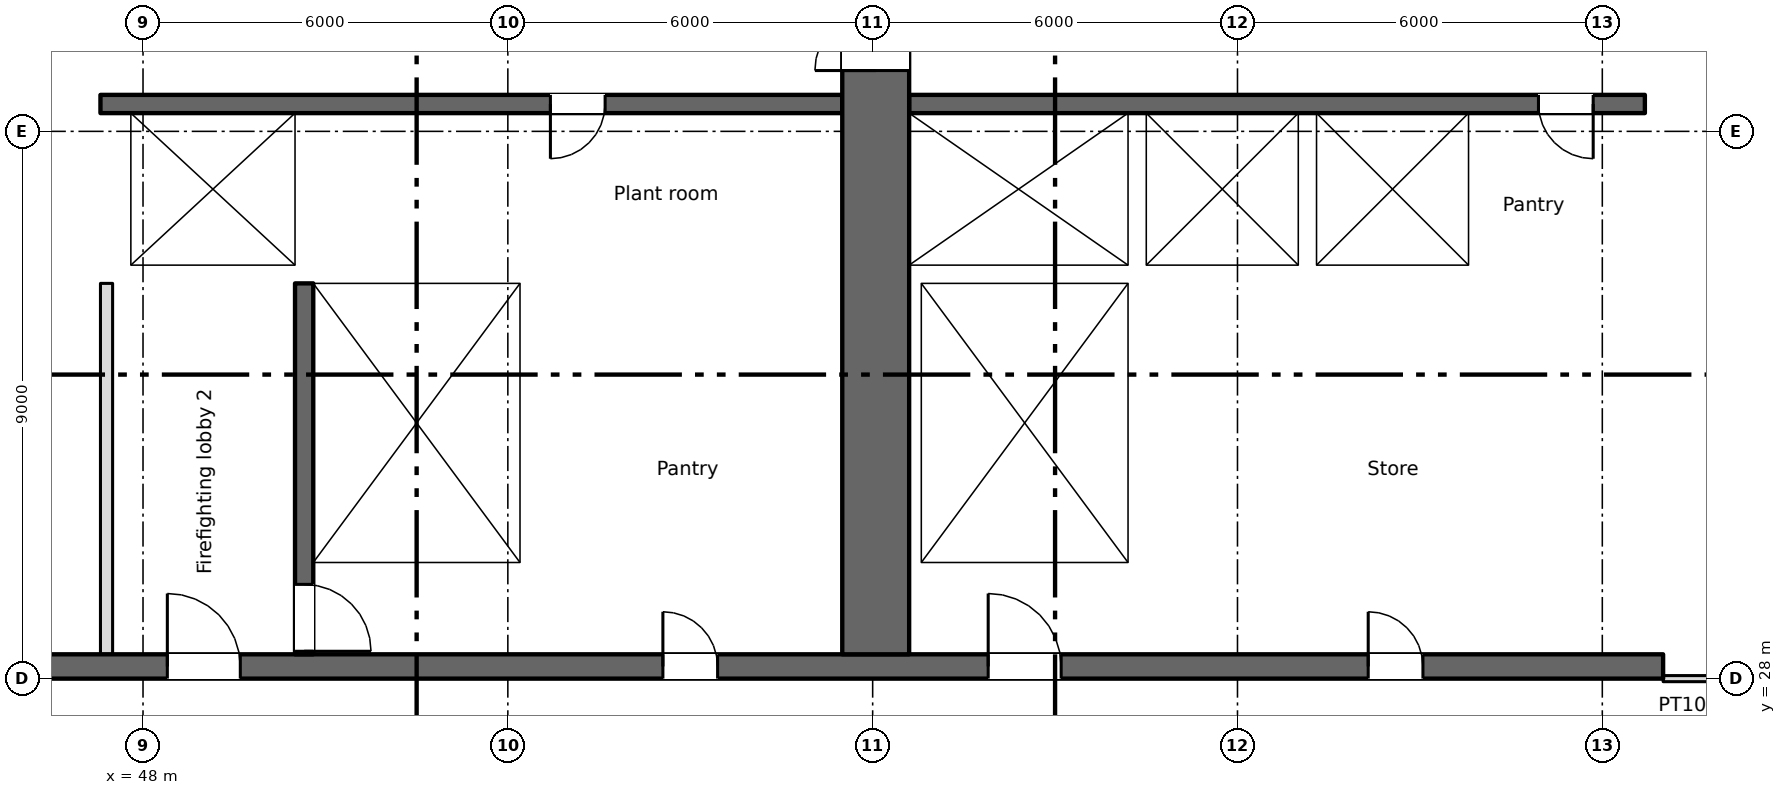
"""IFC4 building model, lengths in metres.
Left out: names, types, materials, properties, quantities, classifications, styles, units other than length and angle.
Written with IfcOpenShell. Run it as: python <this file> out.ifc"""

import sys

from ifc_helpers import new_model, si_unit, direction, frame, frame_2d, origin, place, context, subcontext, project, spatial, rectangle, extrude, element, fill, save


model = new_model("IFC4")
c1 = context("Model", 3, precision=1e-05, world=origin(), true_north=direction((0.0, 1.0)))
c2 = subcontext(c1, "Body", "Model", "MODEL_VIEW")
j1 = project(units=[si_unit("LENGTHUNIT", "METRE"), si_unit("PLANEANGLEUNIT", "RADIAN")], contexts=[c1])
p1 = place(None, origin())
s1 = spatial("IfcSite", under=j1, at=p1, CompositionType="ELEMENT")
p2 = place(p1, origin())
s2 = spatial("IfcBuilding", under=s1, at=p2, CompositionType="ELEMENT")
p3 = place(p2, frame((0.0, 0.0, 17.9)))
s3 = spatial("IfcBuildingStorey", under=s2, at=p3, CompositionType="ELEMENT", Elevation=17.9)
p4 = place(p3, frame((6.7, 28.2, 0.0), z_axis=(0.0, 0.0, 1.0), x_axis=(1.0, 0.0, 0.0)))
e1 = element("IfcWall", 1, at=p4, inside=s3, PredefinedType="SHEAR", context=c2, shape_type="SweptSolid", body=[
    extrude(rectangle(XDim=66.3, YDim=0.4, at=frame_2d((33.15, 0.0))), origin(), (0.0, 0.0, 1.0), 3.8),
])
p5 = place(p4, frame((12.562, 0.0, 0.0)))
e2 = element("IfcOpeningElement", 2, at=p5, cuts=e1, PredefinedType="OPENING", context=c2, shape_type="SweptSolid", body=[
    extrude(rectangle(XDim=0.9, YDim=2.1, at=frame_2d((0.45, 1.05))), frame((0.0, 0.21, 0.0), z_axis=(0.0, -1.0, 0.0), x_axis=(1.0, 0.0, 0.0)), (0.0, 0.0, 1.0), 0.42),
])
p6 = place(p4, frame((15.137, 0.0, 0.0)))
e3 = element("IfcOpeningElement", 3, at=p6, cuts=e1, PredefinedType="OPENING", context=c2, shape_type="SweptSolid", body=[
    extrude(rectangle(XDim=0.9, YDim=2.1, at=frame_2d((0.45, 1.05))), frame((0.0, 0.21, 0.0), z_axis=(0.0, -1.0, 0.0), x_axis=(1.0, 0.0, 0.0)), (0.0, 0.0, 1.0), 0.42),
])
p7 = place(p4, frame((49.85, 0.0, 0.0)))
e4 = element("IfcOpeningElement", 4, at=p7, cuts=e1, PredefinedType="OPENING", context=c2, shape_type="SweptSolid", body=[
    extrude(rectangle(XDim=0.9, YDim=2.1, at=frame_2d((0.45, 1.05))), frame((0.0, 0.21, 0.0), z_axis=(0.0, -1.0, 0.0), x_axis=(1.0, 0.0, 0.0)), (0.0, 0.0, 1.0), 0.42),
])
p8 = place(p4, frame((0.562, 0.0, 0.0)))
e5 = element("IfcOpeningElement", 5, at=p8, cuts=e1, PredefinedType="OPENING", context=c2, shape_type="SweptSolid", body=[
    extrude(rectangle(XDim=0.9, YDim=2.1, at=frame_2d((0.45, 1.05))), frame((0.0, 0.21, 0.0), z_axis=(0.0, -1.0, 0.0), x_axis=(1.0, 0.0, 0.0)), (0.0, 0.0, 1.0), 0.42),
])
p9 = place(p4, frame((2.137, 0.0, 0.0)))
e6 = element("IfcOpeningElement", 6, at=p9, cuts=e1, PredefinedType="OPENING", context=c2, shape_type="SweptSolid", body=[
    extrude(rectangle(XDim=0.9, YDim=2.1, at=frame_2d((0.45, 1.05))), frame((0.0, 0.21, 0.0), z_axis=(0.0, -1.0, 0.0), x_axis=(1.0, 0.0, 0.0)), (0.0, 0.0, 1.0), 0.42),
])
p10 = place(p4, frame((61.45, 0.0, 0.0)))
e7 = element("IfcOpeningElement", 7, at=p10, cuts=e1, PredefinedType="OPENING", context=c2, shape_type="SweptSolid", body=[
    extrude(rectangle(XDim=0.9, YDim=2.1, at=frame_2d((0.45, 1.05))), frame((0.0, 0.21, 0.0), z_axis=(0.0, -1.0, 0.0), x_axis=(1.0, 0.0, 0.0)), (0.0, 0.0, 1.0), 0.42),
])
p11 = place(p4, frame((4.7, 0.0, 0.0)))
e8 = element("IfcOpeningElement", 8, at=p11, cuts=e1, PredefinedType="OPENING", context=c2, shape_type="SweptSolid", body=[
    extrude(rectangle(XDim=1.2, YDim=2.1, at=frame_2d((0.6, 1.05))), frame((0.0, 0.21, 0.0), z_axis=(0.0, -1.0, 0.0), x_axis=(1.0, 0.0, 0.0)), (0.0, 0.0, 1.0), 0.42),
])
p12 = place(p4, frame((31.7, 0.0, 0.0)))
e9 = element("IfcOpeningElement", 9, at=p12, cuts=e1, PredefinedType="OPENING", context=c2, shape_type="SweptSolid", body=[
    extrude(rectangle(XDim=1.2, YDim=2.1, at=frame_2d((0.6, 1.05))), frame((0.0, 0.21, 0.0), z_axis=(0.0, -1.0, 0.0), x_axis=(1.0, 0.0, 0.0)), (0.0, 0.0, 1.0), 0.42),
])
p13 = place(p4, frame((55.2, 0.0, 0.0)))
e10 = element("IfcOpeningElement", 10, at=p13, cuts=e1, PredefinedType="OPENING", context=c2, shape_type="SweptSolid", body=[
    extrude(rectangle(XDim=1.2, YDim=2.1, at=frame_2d((0.6, 1.05))), frame((0.0, 0.21, 0.0), z_axis=(0.0, -1.0, 0.0), x_axis=(1.0, 0.0, 0.0)), (0.0, 0.0, 1.0), 0.42),
])
p14 = place(p4, frame((21.7, 0.0, 0.0)))
e11 = element("IfcOpeningElement", 11, at=p14, cuts=e1, PredefinedType="OPENING", context=c2, shape_type="SweptSolid", body=[
    extrude(rectangle(XDim=1.2, YDim=2.1, at=frame_2d((0.6, 1.05))), frame((0.0, 0.21, 0.0), z_axis=(0.0, -1.0, 0.0), x_axis=(1.0, 0.0, 0.0)), (0.0, 0.0, 1.0), 0.42),
])
p15 = place(p4, frame((41.7, 0.0, 0.0)))
e12 = element("IfcOpeningElement", 12, at=p15, cuts=e1, PredefinedType="OPENING", context=c2, shape_type="SweptSolid", body=[
    extrude(rectangle(XDim=1.2, YDim=2.1, at=frame_2d((0.6, 1.05))), frame((0.0, 0.21, 0.0), z_axis=(0.0, -1.0, 0.0), x_axis=(1.0, 0.0, 0.0)), (0.0, 0.0, 1.0), 0.42),
])
p16 = place(p4, frame((24.85, 0.0, 0.0)))
e13 = element("IfcOpeningElement", 13, at=p16, cuts=e1, PredefinedType="OPENING", context=c2, shape_type="SweptSolid", body=[
    extrude(rectangle(XDim=2.4, YDim=2.1, at=frame_2d((1.2, 1.05))), frame((0.0, 0.21, 0.0), z_axis=(0.0, -1.0, 0.0), x_axis=(1.0, 0.0, 0.0)), (0.0, 0.0, 1.0), 0.42),
])
p17 = place(p4, frame((37.35, 0.0, 0.0)))
e14 = element("IfcOpeningElement", 14, at=p17, cuts=e1, PredefinedType="OPENING", context=c2, shape_type="SweptSolid", body=[
    extrude(rectangle(XDim=2.4, YDim=2.1, at=frame_2d((1.2, 1.05))), frame((0.0, 0.21, 0.0), z_axis=(0.0, -1.0, 0.0), x_axis=(1.0, 0.0, 0.0)), (0.0, 0.0, 1.0), 0.42),
])
p18 = place(p4, frame((7.8, 0.0, 0.0)))
e15 = element("IfcOpeningElement", 15, at=p18, cuts=e1, PredefinedType="OPENING", context=c2, shape_type="SweptSolid", body=[
    extrude(rectangle(XDim=2.4, YDim=2.1, at=frame_2d((1.2, 1.05))), frame((0.0, 0.21, 0.0), z_axis=(0.0, -1.0, 0.0), x_axis=(1.0, 0.0, 0.0)), (0.0, 0.0, 1.0), 0.42),
])
p19 = place(p4, frame((28.85, 0.0, 0.0)))
e16 = element("IfcOpeningElement", 16, at=p19, cuts=e1, PredefinedType="OPENING", context=c2, shape_type="SweptSolid", body=[
    extrude(rectangle(XDim=0.9, YDim=2.1, at=frame_2d((0.45, 1.05))), frame((0.0, 0.21, 0.0), z_axis=(0.0, -1.0, 0.0), x_axis=(1.0, 0.0, 0.0)), (0.0, 0.0, 1.0), 0.42),
])
p20 = place(p4, frame((34.85, 0.0, 0.0)))
e17 = element("IfcOpeningElement", 17, at=p20, cuts=e1, PredefinedType="OPENING", context=c2, shape_type="SweptSolid", body=[
    extrude(rectangle(XDim=0.9, YDim=2.1, at=frame_2d((0.45, 1.05))), frame((0.0, 0.21, 0.0), z_axis=(0.0, -1.0, 0.0), x_axis=(1.0, 0.0, 0.0)), (0.0, 0.0, 1.0), 0.42),
])
p21 = place(p3, frame((72.85, 28.4, 0.0), z_axis=(0.0, 0.0, 1.0), x_axis=(0.0, 1.0, 0.0)))
e18 = element("IfcWall", 18, at=p21, inside=s3, PredefinedType="SHEAR", context=c2, shape_type="SweptSolid", body=[
    extrude(rectangle(XDim=12.85, YDim=0.3, at=frame_2d((6.425, 0.0))), origin(), (0.0, 0.0, 1.0), 3.8),
])
p22 = place(p3, frame((64.35, 34.8, 0.0), z_axis=(0.0, 0.0, 1.0), x_axis=(0.0, 1.0, 0.0)))
e19 = element("IfcWall", 19, at=p22, inside=s3, PredefinedType="SHEAR", context=c2, shape_type="SweptSolid", body=[
    extrude(rectangle(XDim=2.5, YDim=0.3, at=frame_2d((1.25, 0.0))), origin(), (0.0, 0.0, 1.0), 3.8),
])
p23 = place(p3, frame((60.05, 28.4, 0.0), z_axis=(0.0, 0.0, 1.0), x_axis=(0.0, 1.0, 0.0)))
e20 = element("IfcWall", 20, at=p23, inside=s3, PredefinedType="SHEAR", context=c2, shape_type="SweptSolid", body=[
    extrude(rectangle(XDim=16.5, YDim=1.1, at=frame_2d((8.25, 0.0))), origin(), (0.0, 0.0, 1.0), 3.8),
])
p24 = place(p23, frame((9.6, 0.0, 0.0)))
e21 = element("IfcOpeningElement", 21, at=p24, cuts=e20, PredefinedType="OPENING", context=c2, shape_type="SweptSolid", body=[
    extrude(rectangle(XDim=2.0, YDim=2.1, at=frame_2d((1.0, 1.05))), frame((0.0, 0.56, 0.0), z_axis=(0.0, -1.0, 0.0), x_axis=(1.0, 0.0, 0.0)), (0.0, 0.0, 1.0), 1.12),
])
p25 = place(p23, frame((15.2, 0.0, 0.0)))
e22 = element("IfcOpeningElement", 22, at=p25, cuts=e20, PredefinedType="OPENING", context=c2, shape_type="SweptSolid", body=[
    extrude(rectangle(XDim=1.2, YDim=2.1, at=frame_2d((0.6, 1.05))), frame((0.0, 0.56, 0.0), z_axis=(0.0, -1.0, 0.0), x_axis=(1.0, 0.0, 0.0)), (0.0, 0.0, 1.0), 1.12),
])
p26 = place(p3, frame((50.65, 34.5, 0.0), z_axis=(0.0, 0.0, 1.0), x_axis=(0.0, -1.0, 0.0)))
e23 = element("IfcWall", 23, at=p26, inside=s3, PredefinedType="SHEAR", context=c2, shape_type="SweptSolid", body=[
    extrude(rectangle(XDim=6.1, YDim=0.3, at=frame_2d((3.05, 0.0))), origin(), (0.0, 0.0, 1.0), 3.8),
])
p27 = place(p26, frame((4.95, 0.0, 0.0)))
e24 = element("IfcOpeningElement", 24, at=p27, cuts=e23, PredefinedType="OPENING", context=c2, shape_type="SweptSolid", body=[
    extrude(rectangle(XDim=1.1, YDim=2.1, at=frame_2d((0.55, 1.05))), frame((0.0, 0.16, 0.0), z_axis=(0.0, -1.0, 0.0), x_axis=(1.0, 0.0, 0.0)), (0.0, 0.0, 1.0), 0.32),
])
p28 = place(p3, frame((54.35, 28.4, 0.0), z_axis=(0.0, 0.0, 1.0), x_axis=(0.0, 1.0, 0.0)))
e25 = element("IfcWall", 25, at=p28, inside=s3, PredefinedType="SHEAR", context=c2, shape_type="SweptSolid", body=[
    extrude(rectangle(XDim=6.1, YDim=0.3, at=frame_2d((3.05, 0.0))), origin(), (0.0, 0.0, 1.0), 3.8),
])
p29 = place(p3, frame((60.7, 28.4, 0.0), z_axis=(0.0, 0.0, 1.0), x_axis=(0.0, 1.0, 0.0)))
e26 = element("IfcWall", 26, at=p29, inside=s3, PredefinedType="SHEAR", context=c2, shape_type="SweptSolid", body=[
    extrude(rectangle(XDim=6.1, YDim=0.2, at=frame_2d((3.05, 0.0))), origin(), (0.0, 0.0, 1.0), 3.8),
])
p30 = place(p3, frame((64.35, 28.4, 0.0), z_axis=(0.0, 0.0, 1.0), x_axis=(0.0, 1.0, 0.0)))
e27 = element("IfcWall", 27, at=p30, inside=s3, PredefinedType="SHEAR", context=c2, shape_type="SweptSolid", body=[
    extrude(rectangle(XDim=6.1, YDim=0.3, at=frame_2d((3.05, 0.0))), origin(), (0.0, 0.0, 1.0), 3.8),
])
p31 = place(p3, frame((47.3, 34.65, 0.0), z_axis=(0.0, 0.0, 1.0), x_axis=(1.0, 0.0, 0.0)))
e28 = element("IfcWall", 28, at=p31, inside=s3, PredefinedType="SHEAR", context=c2, shape_type="SweptSolid", body=[
    extrude(rectangle(XDim=12.2, YDim=0.3, at=frame_2d((6.1, 0.0))), origin(), (0.0, 0.0, 1.0), 3.8),
])
p32 = place(p31, frame((1.3, 0.0, 0.0)))
e29 = element("IfcOpeningElement", 29, at=p32, cuts=e28, PredefinedType="OPENING", context=c2, shape_type="SweptSolid", body=[
    extrude(rectangle(XDim=1.1, YDim=2.1, at=frame_2d((0.55, 1.05))), frame((0.0, 0.16, 0.0), z_axis=(0.0, -1.0, 0.0), x_axis=(1.0, 0.0, 0.0)), (0.0, 0.0, 1.0), 0.32),
])
p33 = place(p3, frame((60.6, 34.65, 0.0), z_axis=(0.0, 0.0, 1.0), x_axis=(1.0, 0.0, 0.0)))
e30 = element("IfcWall", 30, at=p33, inside=s3, PredefinedType="SHEAR", context=c2, shape_type="SweptSolid", body=[
    extrude(rectangle(XDim=12.1, YDim=0.3, at=frame_2d((6.05, 0.0))), origin(), (0.0, 0.0, 1.0), 3.8),
])
p34 = place(p3, frame((59.5, 37.45, 0.0), z_axis=(0.0, 0.0, 1.0), x_axis=(-1.0, 0.0, 0.0)))
e31 = element("IfcWall", 31, at=p34, inside=s3, PredefinedType="SHEAR", context=c2, shape_type="SweptSolid", body=[
    extrude(rectangle(XDim=12.2, YDim=0.3, at=frame_2d((6.1, 0.0))), origin(), (0.0, 0.0, 1.0), 3.8),
])
p35 = place(p34, frame((3.9, 0.0, 0.0)))
e32 = element("IfcOpeningElement", 32, at=p35, cuts=e31, PredefinedType="OPENING", context=c2, shape_type="SweptSolid", body=[
    extrude(rectangle(XDim=0.9, YDim=2.1, at=frame_2d((0.45, 1.05))), frame((0.0, 0.16, 0.0), z_axis=(0.0, -1.0, 0.0), x_axis=(1.0, 0.0, 0.0)), (0.0, 0.0, 1.0), 0.32),
])
p36 = place(p3, frame((72.7, 37.45, 0.0), z_axis=(0.0, 0.0, 1.0), x_axis=(-1.0, 0.0, 0.0)))
e33 = element("IfcWall", 33, at=p36, inside=s3, PredefinedType="SHEAR", context=c2, shape_type="SweptSolid", body=[
    extrude(rectangle(XDim=12.1, YDim=0.3, at=frame_2d((6.05, 0.0))), origin(), (0.0, 0.0, 1.0), 3.8),
])
p37 = place(p36, frame((0.85, 0.0, 0.0)))
e34 = element("IfcOpeningElement", 34, at=p37, cuts=e33, PredefinedType="OPENING", context=c2, shape_type="SweptSolid", body=[
    extrude(rectangle(XDim=0.9, YDim=2.1, at=frame_2d((0.45, 1.05))), frame((0.0, 0.16, 0.0), z_axis=(0.0, -1.0, 0.0), x_axis=(1.0, 0.0, 0.0)), (0.0, 0.0, 1.0), 0.32),
])
p38 = place(p36, frame((9.75, 0.0, 0.0)))
e35 = element("IfcOpeningElement", 35, at=p38, cuts=e33, PredefinedType="OPENING", context=c2, shape_type="SweptSolid", body=[
    extrude(rectangle(XDim=1.1, YDim=2.1, at=frame_2d((0.55, 1.05))), frame((0.0, 0.16, 0.0), z_axis=(0.0, -1.0, 0.0), x_axis=(1.0, 0.0, 0.0)), (0.0, 0.0, 1.0), 0.32),
])
p39 = place(p36, frame((6.4, 0.0, 0.0)))
e36 = element("IfcOpeningElement", 36, at=p39, cuts=e33, PredefinedType="OPENING", context=c2, shape_type="SweptSolid", body=[
    extrude(rectangle(XDim=1.1, YDim=2.1, at=frame_2d((0.55, 1.05))), frame((0.0, 0.16, 0.0), z_axis=(0.0, -1.0, 0.0), x_axis=(1.0, 0.0, 0.0)), (0.0, 0.0, 1.0), 0.32),
])
p40 = place(p36, frame((3.6, 0.0, 0.0)))
e37 = element("IfcOpeningElement", 37, at=p40, cuts=e33, PredefinedType="OPENING", context=c2, shape_type="SweptSolid", body=[
    extrude(rectangle(XDim=1.1, YDim=2.1, at=frame_2d((0.55, 1.05))), frame((0.0, 0.16, 0.0), z_axis=(0.0, -1.0, 0.0), x_axis=(1.0, 0.0, 0.0)), (0.0, 0.0, 1.0), 0.32),
])
p41 = place(p3, frame((47.55, 34.8, 0.0), z_axis=(0.0, 0.0, 1.0), x_axis=(0.0, 1.0, 0.0)))
e38 = element("IfcWall", 38, at=p41, inside=s3, PredefinedType="SHEAR", context=c2, shape_type="SweptSolid", body=[
    extrude(rectangle(XDim=2.5, YDim=0.5, at=frame_2d((1.25, 0.0))), origin(), (0.0, 0.0, 1.0), 3.8),
])
for number, where, z_axis, x_axis in (
    (39, (50.65, 34.8, 0.0), (0.0, 0.0, 1.0), (0.0, 1.0, 0.0)),
    (40, (67.15, 34.8, 0.0), (0.0, 0.0, 1.0), (0.0, 1.0, 0.0)),
    (41, (69.95, 34.8, 0.0), (0.0, 0.0, 1.0), (0.0, 1.0, 0.0)),
):
    element("IfcWall", number, at=place(p3, frame(where, z_axis=z_axis, x_axis=x_axis)), inside=s3, PredefinedType="SHEAR", context=c2, shape_type="SweptSolid", body=[
        extrude(rectangle(XDim=2.5, YDim=0.3, at=frame_2d((1.25, 0.0))), origin(), (0.0, 0.0, 1.0), 3.8),
    ])
p42 = place(p3, frame((47.4, 28.4, 0.0), z_axis=(0.0, 0.0, 1.0), x_axis=(0.0, 1.0, 0.0)))
e42 = element("IfcWall", 42, at=p42, inside=s3, PredefinedType="PARTITIONING", context=c2, shape_type="SweptSolid", body=[
    extrude(rectangle(XDim=6.1, YDim=0.2, at=frame_2d((3.05, 0.0))), origin(), (0.0, 0.0, 1.0), 3.8),
])
p43 = place(p3, frame((73.0, 28.0, 0.0), z_axis=(0.0, 0.0, 1.0), x_axis=(1.0, 0.0, 0.0)))
e43 = element("IfcWall", 43, at=p43, inside=s3, PredefinedType="PARTITIONING", context=c2, shape_type="SweptSolid", body=[
    extrude(rectangle(XDim=4.2, YDim=0.1, at=frame_2d((2.1, 0.0))), origin(), (0.0, 0.0, 1.0), 3.8),
])
p44 = place(p43, frame((1.6, 0.0, 0.0)))
e44 = element("IfcOpeningElement", 44, at=p44, cuts=e43, PredefinedType="OPENING", context=c2, shape_type="SweptSolid", body=[
    extrude(rectangle(XDim=1.0, YDim=2.1, at=frame_2d((0.5, 1.05))), frame((0.0, 0.06, 0.0), z_axis=(0.0, -1.0, 0.0), x_axis=(1.0, 0.0, 0.0)), (0.0, 0.0, 1.0), 0.12),
])
p45 = place(p7, origin())
e45 = element("IfcDoor", 45, at=p45, inside=s3, OperationType="SINGLE_SWING_LEFT", PredefinedType="DOOR", context=c2, shape_type="SweptSolid", body=[
    extrude(rectangle(XDim=0.9, YDim=2.1, at=frame_2d((0.45, 1.05))), frame((0.0, 0.025, 0.0), z_axis=(0.0, -1.0, 0.0), x_axis=(1.0, 0.0, 0.0)), (0.0, 0.0, 1.0), 0.05),
])
fill(e4, e45)
p46 = place(p10, origin())
e46 = element("IfcDoor", 46, at=p46, inside=s3, OperationType="SINGLE_SWING_LEFT", PredefinedType="DOOR", context=c2, shape_type="SweptSolid", body=[
    extrude(rectangle(XDim=0.9, YDim=2.1, at=frame_2d((0.45, 1.05))), frame((0.0, 0.025, 0.0), z_axis=(0.0, -1.0, 0.0), x_axis=(1.0, 0.0, 0.0)), (0.0, 0.0, 1.0), 0.05),
])
fill(e7, e46)
p47 = place(p35, origin())
e47 = element("IfcDoor", 47, at=p47, inside=s3, OperationType="SINGLE_SWING_RIGHT", PredefinedType="DOOR", context=c2, shape_type="SweptSolid", body=[
    extrude(rectangle(XDim=0.9, YDim=2.1, at=frame_2d((0.45, 1.05))), frame((0.0, 0.025, 0.0), z_axis=(0.0, -1.0, 0.0), x_axis=(1.0, 0.0, 0.0)), (0.0, 0.0, 1.0), 0.05),
])
fill(e32, e47)
p48 = place(p37, origin())
e48 = element("IfcDoor", 48, at=p48, inside=s3, OperationType="SINGLE_SWING_LEFT", PredefinedType="DOOR", context=c2, shape_type="SweptSolid", body=[
    extrude(rectangle(XDim=0.9, YDim=2.1, at=frame_2d((0.45, 1.05))), frame((0.0, 0.025, 0.0), z_axis=(0.0, -1.0, 0.0), x_axis=(1.0, 0.0, 0.0)), (0.0, 0.0, 1.0), 0.05),
])
fill(e34, e48)
p49 = place(p38, origin())
e49 = element("IfcDoor", 49, at=p49, inside=s3, OperationType="SLIDING_TO_LEFT", PredefinedType="DOOR", context=c2, shape_type="SweptSolid", body=[
    extrude(rectangle(XDim=1.1, YDim=2.1, at=frame_2d((0.55, 1.05))), frame((0.0, 0.025, 0.0), z_axis=(0.0, -1.0, 0.0), x_axis=(1.0, 0.0, 0.0)), (0.0, 0.0, 1.0), 0.05),
])
fill(e35, e49)
p50 = place(p39, origin())
e50 = element("IfcDoor", 50, at=p50, inside=s3, OperationType="SLIDING_TO_LEFT", PredefinedType="DOOR", context=c2, shape_type="SweptSolid", body=[
    extrude(rectangle(XDim=1.1, YDim=2.1, at=frame_2d((0.55, 1.05))), frame((0.0, 0.025, 0.0), z_axis=(0.0, -1.0, 0.0), x_axis=(1.0, 0.0, 0.0)), (0.0, 0.0, 1.0), 0.05),
])
fill(e36, e50)
p51 = place(p40, origin())
e51 = element("IfcDoor", 51, at=p51, inside=s3, OperationType="SLIDING_TO_LEFT", PredefinedType="DOOR", context=c2, shape_type="SweptSolid", body=[
    extrude(rectangle(XDim=1.1, YDim=2.1, at=frame_2d((0.55, 1.05))), frame((0.0, 0.025, 0.0), z_axis=(0.0, -1.0, 0.0), x_axis=(1.0, 0.0, 0.0)), (0.0, 0.0, 1.0), 0.05),
])
fill(e37, e51)
p52 = place(p32, origin())
e52 = element("IfcDoor", 52, at=p52, inside=s3, OperationType="SLIDING_TO_LEFT", PredefinedType="DOOR", context=c2, shape_type="SweptSolid", body=[
    extrude(rectangle(XDim=1.1, YDim=2.1, at=frame_2d((0.55, 1.05))), frame((0.0, 0.025, 0.0), z_axis=(0.0, -1.0, 0.0), x_axis=(1.0, 0.0, 0.0)), (0.0, 0.0, 1.0), 0.05),
])
fill(e29, e52)
p53 = place(p27, origin())
e53 = element("IfcDoor", 53, at=p53, inside=s3, OperationType="SINGLE_SWING_RIGHT", PredefinedType="DOOR", context=c2, shape_type="SweptSolid", body=[
    extrude(rectangle(XDim=1.1, YDim=2.1, at=frame_2d((0.55, 1.05))), frame((0.0, 0.025, 0.0), z_axis=(0.0, -1.0, 0.0), x_axis=(1.0, 0.0, 0.0)), (0.0, 0.0, 1.0), 0.05),
])
fill(e24, e53)
p54 = place(p13, origin())
e54 = element("IfcDoor", 54, at=p54, inside=s3, OperationType="SINGLE_SWING_LEFT", PredefinedType="DOOR", context=c2, shape_type="SweptSolid", body=[
    extrude(rectangle(XDim=1.2, YDim=2.1, at=frame_2d((0.6, 1.05))), frame((0.0, 0.025, 0.0), z_axis=(0.0, -1.0, 0.0), x_axis=(1.0, 0.0, 0.0)), (0.0, 0.0, 1.0), 0.05),
])
fill(e10, e54)
p55 = place(p15, origin())
e55 = element("IfcDoor", 55, at=p55, inside=s3, OperationType="SINGLE_SWING_LEFT", PredefinedType="DOOR", context=c2, shape_type="SweptSolid", body=[
    extrude(rectangle(XDim=1.2, YDim=2.1, at=frame_2d((0.6, 1.05))), frame((0.0, 0.025, 0.0), z_axis=(0.0, -1.0, 0.0), x_axis=(1.0, 0.0, 0.0)), (0.0, 0.0, 1.0), 0.05),
])
fill(e12, e55)
p56 = place(p24, origin())
e56 = element("IfcDoor", 56, at=p56, inside=s3, OperationType="DOUBLE_DOOR_SINGLE_SWING", PredefinedType="DOOR", context=c2, shape_type="SweptSolid", body=[
    extrude(rectangle(XDim=2.0, YDim=2.1, at=frame_2d((1.0, 1.05))), frame((0.0, 0.025, 0.0), z_axis=(0.0, -1.0, 0.0), x_axis=(1.0, 0.0, 0.0)), (0.0, 0.0, 1.0), 0.05),
])
fill(e21, e56)
save(model, sys.argv[1])
